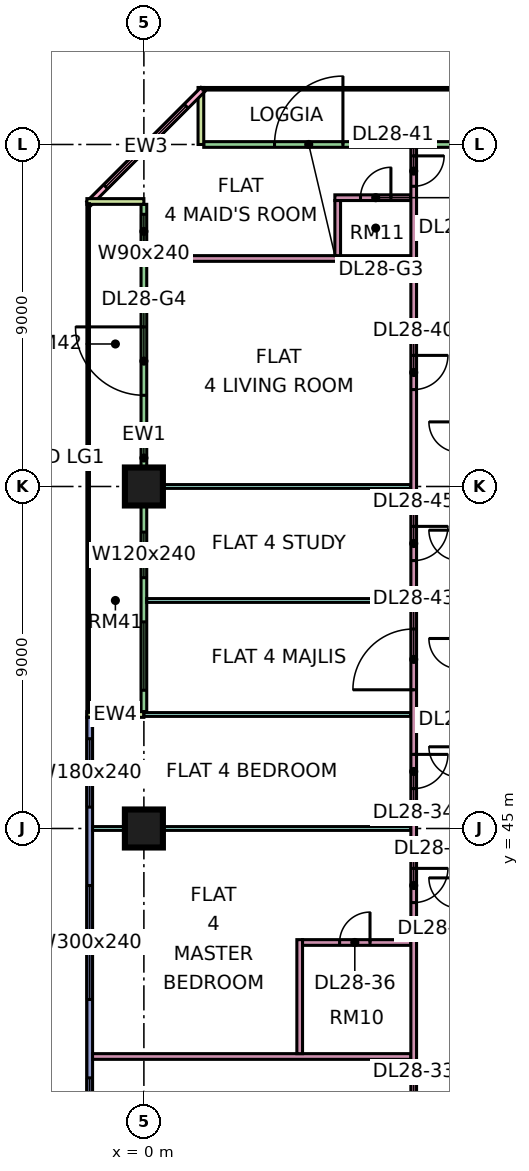
"""IFC4 building model, lengths in metres.
Left out: names, types, materials, properties, quantities, classifications, styles, units other than length and angle.
Written with IfcOpenShell. Run it as: python <this file> out.ifc"""

import sys

from ifc_helpers import new_model, si_unit, direction, frame, frame_2d, origin, origin_2d, place, context, subcontext, project, spatial, rectangle, extrude, element, fill, save


model = new_model("IFC4")
c1 = context("Model", 3, precision=1e-05, world=origin(), true_north=direction((0.0, 1.0)))
c2 = subcontext(c1, "Body", "Model", "MODEL_VIEW")
j1 = project(units=[si_unit("LENGTHUNIT", "METRE"), si_unit("PLANEANGLEUNIT", "RADIAN")], contexts=[c1])
p1 = place(None, origin())
s1 = spatial("IfcSite", under=j1, at=p1, CompositionType="ELEMENT")
p2 = place(p1, origin())
s2 = spatial("IfcBuilding", under=s1, at=p2, CompositionType="ELEMENT")
p3 = place(p2, frame((0.0, 0.0, 121.9)))
s3 = spatial("IfcBuildingStorey", under=s2, at=p3, CompositionType="ELEMENT", Elevation=121.9)
for number, where, z_axis, x_axis in (
    (1, (0.0, 45.0, 0.0), (0.0, 0.0, 1.0), (1.0, 0.0, 0.0)),
    (2, (0.0, 54.0, 0.0), (0.0, 0.0, 1.0), (1.0, 0.0, 0.0)),
):
    element("IfcColumn", number, at=place(p3, frame(where, z_axis=z_axis, x_axis=x_axis)), inside=s3, PredefinedType="COLUMN", context=c2, shape_type="SweptSolid", body=[
        extrude(rectangle(XDim=1.0, YDim=1.0, at=origin_2d()), origin(), (0.0, 0.0, 1.0), 3.75),
    ])
p4 = place(p3, frame((11.925, 63.0, 0.0), z_axis=(0.0, 0.0, 1.0), x_axis=(-1.0, 0.0, 0.0)))
e3 = element("IfcWall", 3, at=p4, inside=s3, PredefinedType="SOLIDWALL", context=c2, shape_type="SweptSolid", body=[
    extrude(rectangle(XDim=10.35, YDim=0.15, at=frame_2d((5.175, 0.0))), origin(), (0.0, 0.0, 1.0), 3.35),
])
p5 = place(p4, frame((0.875, 0.0, 0.45)))
e4 = element("IfcOpeningElement", 4, at=p5, cuts=e3, PredefinedType="OPENING", context=c2, shape_type="SweptSolid", body=[
    extrude(rectangle(XDim=2.4, YDim=2.4, at=frame_2d((1.2, 1.2))), frame((0.0, 0.085, 0.0), z_axis=(0.0, -1.0, 0.0), x_axis=(1.0, 0.0, 0.0)), (0.0, 0.0, 1.0), 0.17),
])
p6 = place(p4, frame((6.688, 0.0, 0.0)))
e5 = element("IfcOpeningElement", 5, at=p6, cuts=e3, PredefinedType="OPENING", context=c2, shape_type="SweptSolid", body=[
    extrude(rectangle(XDim=1.8, YDim=2.4, at=frame_2d((0.9, 1.2))), frame((0.0, 0.085, 0.0), z_axis=(0.0, -1.0, 0.0), x_axis=(1.0, 0.0, 0.0)), (0.0, 0.0, 1.0), 0.17),
])
p7 = place(p3, frame((1.5, 64.5, 0.0), z_axis=(0.0, 0.0, 1.0), x_axis=(0.0, -1.0, 0.0)))
e6 = element("IfcWall", 6, at=p7, inside=s3, PredefinedType="SOLIDWALL", context=c2, shape_type="SweptSolid", body=[
    extrude(rectangle(XDim=1.5, YDim=0.15, at=frame_2d((0.75, 0.0))), origin(), (0.0, 0.0, 1.0), 3.35),
])
p8 = place(p3, frame((1.553, 64.447, 0.0), z_axis=(0.0, 0.0, 1.0), x_axis=(-0.707106781187, -0.707106781187, 0.0)))
e7 = element("IfcWall", 7, at=p8, inside=s3, PredefinedType="SOLIDWALL", context=c2, shape_type="SweptSolid", body=[
    extrude(rectangle(XDim=4.243, YDim=0.15, at=frame_2d((2.121, 0.0))), origin(), (0.0, 0.0, 1.0), 3.35),
])
p9 = place(p8, frame((0.621, 0.0, 0.45)))
e8 = element("IfcOpeningElement", 8, at=p9, cuts=e7, PredefinedType="OPENING", context=c2, shape_type="SweptSolid", body=[
    extrude(rectangle(XDim=3.0, YDim=2.4, at=frame_2d((1.5, 1.2))), frame((0.0, 0.085, 0.0), z_axis=(0.0, -1.0, 0.0), x_axis=(1.0, 0.0, 0.0)), (0.0, 0.0, 1.0), 0.17),
])
p10 = place(p3, frame((0.0, 61.425, 0.0), z_axis=(0.0, 0.0, 1.0), x_axis=(0.0, -1.0, 0.0)))
e9 = element("IfcWall", 9, at=p10, inside=s3, PredefinedType="SOLIDWALL", context=c2, shape_type="SweptSolid", body=[
    extrude(rectangle(XDim=13.35, YDim=0.15, at=frame_2d((6.675, 0.0))), origin(), (0.0, 0.0, 1.0), 3.35),
])
p11 = place(p10, frame((0.262, 0.0, 0.45)))
e10 = element("IfcOpeningElement", 10, at=p11, cuts=e9, PredefinedType="OPENING", context=c2, shape_type="SweptSolid", body=[
    extrude(rectangle(XDim=0.9, YDim=2.4, at=frame_2d((0.45, 1.2))), frame((0.0, 0.085, 0.0), z_axis=(0.0, -1.0, 0.0), x_axis=(1.0, 0.0, 0.0)), (0.0, 0.0, 1.0), 0.17),
])
p12 = place(p10, frame((3.225, 0.0, 0.0)))
e11 = element("IfcOpeningElement", 11, at=p12, cuts=e9, PredefinedType="OPENING", context=c2, shape_type="SweptSolid", body=[
    extrude(rectangle(XDim=1.8, YDim=2.4, at=frame_2d((0.9, 1.2))), frame((0.0, 0.085, 0.0), z_axis=(0.0, -1.0, 0.0), x_axis=(1.0, 0.0, 0.0)), (0.0, 0.0, 1.0), 0.17),
])
p13 = place(p10, frame((8.625, 0.0, 0.45)))
e12 = element("IfcOpeningElement", 12, at=p13, cuts=e9, PredefinedType="OPENING", context=c2, shape_type="SweptSolid", body=[
    extrude(rectangle(XDim=1.2, YDim=2.4, at=frame_2d((0.6, 1.2))), frame((0.0, 0.085, 0.0), z_axis=(0.0, -1.0, 0.0), x_axis=(1.0, 0.0, 0.0)), (0.0, 0.0, 1.0), 0.17),
])
p14 = place(p10, frame((10.988, 0.0, 0.45)))
e13 = element("IfcOpeningElement", 13, at=p14, cuts=e9, PredefinedType="OPENING", context=c2, shape_type="SweptSolid", body=[
    extrude(rectangle(XDim=1.8, YDim=2.4, at=frame_2d((0.9, 1.2))), frame((0.0, 0.085, 0.0), z_axis=(0.0, -1.0, 0.0), x_axis=(1.0, 0.0, 0.0)), (0.0, 0.0, 1.0), 0.17),
])
for number, where, z_axis, x_axis in (
    (14, (-1.5, 61.5, 0.0), (0.0, 0.0, 1.0), (1.0, 0.0, 0.0)),
    (15, (-1.5, 48.0, 0.0), (0.0, 0.0, 1.0), (1.0, 0.0, 0.0)),
):
    element("IfcWall", number, at=place(p3, frame(where, z_axis=z_axis, x_axis=x_axis)), inside=s3, PredefinedType="SOLIDWALL", context=c2, shape_type="SweptSolid", body=[
        extrude(rectangle(XDim=1.5, YDim=0.15, at=frame_2d((0.75, 0.0))), origin(), (0.0, 0.0, 1.0), 3.35),
    ])
p15 = place(p3, frame((-1.425, 47.925, 0.0), z_axis=(0.0, 0.0, 1.0), x_axis=(0.0, -1.0, 0.0)))
e16 = element("IfcWall", 16, at=p15, inside=s3, PredefinedType="SOLIDWALL", context=c2, shape_type="SweptSolid", body=[
    extrude(rectangle(XDim=11.85, YDim=0.15, at=frame_2d((5.925, 0.0))), origin(), (0.0, 0.0, 1.0), 3.35),
])
p16 = place(p15, frame((0.562, 0.0, 0.45)))
e17 = element("IfcOpeningElement", 17, at=p16, cuts=e16, PredefinedType="OPENING", context=c2, shape_type="SweptSolid", body=[
    extrude(rectangle(XDim=1.8, YDim=2.4, at=frame_2d((0.9, 1.2))), frame((0.0, 0.085, 0.0), z_axis=(0.0, -1.0, 0.0), x_axis=(1.0, 0.0, 0.0)), (0.0, 0.0, 1.0), 0.17),
])
p17 = place(p15, frame((4.425, 0.0, 0.45)))
e18 = element("IfcOpeningElement", 18, at=p17, cuts=e16, PredefinedType="OPENING", context=c2, shape_type="SweptSolid", body=[
    extrude(rectangle(XDim=3.0, YDim=2.4, at=frame_2d((1.5, 1.2))), frame((0.0, 0.085, 0.0), z_axis=(0.0, -1.0, 0.0), x_axis=(1.0, 0.0, 0.0)), (0.0, 0.0, 1.0), 0.17),
])
p18 = place(p15, frame((9.488, 0.0, 0.45)))
e19 = element("IfcOpeningElement", 19, at=p18, cuts=e16, PredefinedType="OPENING", context=c2, shape_type="SweptSolid", body=[
    extrude(rectangle(XDim=1.8, YDim=2.4, at=frame_2d((0.9, 1.2))), frame((0.0, 0.085, 0.0), z_axis=(0.0, -1.0, 0.0), x_axis=(1.0, 0.0, 0.0)), (0.0, 0.0, 1.0), 0.17),
])
p19 = place(p3, frame((-1.351, 39.0, 0.0), z_axis=(0.0, 0.0, 1.0), x_axis=(1.0, 0.0, 0.0)))
e20 = element("IfcWall", 20, at=p19, inside=s3, PredefinedType="PARTITIONING", context=c2, shape_type="SweptSolid", body=[
    extrude(rectangle(XDim=8.376, YDim=0.15, at=frame_2d((4.188, 0.0))), origin(), (0.0, 0.0, 1.0), 3.35),
])
p20 = place(p3, frame((-1.351, 45.0, 0.0), z_axis=(0.0, 0.0, 1.0), x_axis=(1.0, 0.0, 0.0)))
e21 = element("IfcWall", 21, at=p20, inside=s3, PredefinedType="PARTITIONING", context=c2, shape_type="SweptSolid", body=[
    extrude(rectangle(XDim=8.376, YDim=0.1, at=frame_2d((4.188, 0.0))), origin(), (0.0, 0.0, 1.0), 3.35),
])
p21 = place(p3, frame((0.0, 48.0, 0.0), z_axis=(0.0, 0.0, 1.0), x_axis=(1.0, 0.0, 0.0)))
e22 = element("IfcWall", 22, at=p21, inside=s3, PredefinedType="PARTITIONING", context=c2, shape_type="SweptSolid", body=[
    extrude(rectangle(XDim=7.025, YDim=0.1, at=frame_2d((3.512, 0.0))), origin(), (0.0, 0.0, 1.0), 3.35),
])
for number, where, z_axis, x_axis in (
    (23, (0.074, 51.0, 0.0), (0.0, 0.0, 1.0), (1.0, 0.0, 0.0)),
    (24, (0.074, 54.0, 0.0), (0.0, 0.0, 1.0), (1.0, 0.0, 0.0)),
):
    element("IfcWall", number, at=place(p3, frame(where, z_axis=z_axis, x_axis=x_axis)), inside=s3, PredefinedType="PARTITIONING", context=c2, shape_type="SweptSolid", body=[
        extrude(rectangle(XDim=6.951, YDim=0.1, at=frame_2d((3.476, 0.0))), origin(), (0.0, 0.0, 1.0), 3.35),
    ])
p22 = place(p3, frame((0.074, 60.0, 0.0), z_axis=(0.0, 0.0, 1.0), x_axis=(1.0, 0.0, 0.0)))
e25 = element("IfcWall", 25, at=p22, inside=s3, PredefinedType="PARTITIONING", context=c2, shape_type="SweptSolid", body=[
    extrude(rectangle(XDim=6.951, YDim=0.15, at=frame_2d((3.476, 0.0))), origin(), (0.0, 0.0, 1.0), 3.35),
])
p23 = place(p3, frame((4.1, 39.075, 0.0), z_axis=(0.0, 0.0, 1.0), x_axis=(0.0, 1.0, 0.0)))
e26 = element("IfcWall", 26, at=p23, inside=s3, PredefinedType="PARTITIONING", context=c2, shape_type="SweptSolid", body=[
    extrude(rectangle(XDim=3.0, YDim=0.15, at=frame_2d((1.5, 0.0))), origin(), (0.0, 0.0, 1.0), 3.35),
])
p24 = place(p3, frame((4.175, 42.0, 0.0), z_axis=(0.0, 0.0, 1.0), x_axis=(1.0, 0.0, 0.0)))
e27 = element("IfcWall", 27, at=p24, inside=s3, PredefinedType="PARTITIONING", context=c2, shape_type="SweptSolid", body=[
    extrude(rectangle(XDim=2.85, YDim=0.15, at=frame_2d((1.425, 0.0))), origin(), (0.0, 0.0, 1.0), 3.35),
])
p25 = place(p24, frame((0.975, 0.0, 0.0)))
e28 = element("IfcOpeningElement", 28, at=p25, cuts=e27, PredefinedType="OPENING", context=c2, shape_type="SweptSolid", body=[
    extrude(rectangle(XDim=0.8, YDim=2.1, at=frame_2d((0.4, 1.05))), frame((0.0, 0.085, 0.0), z_axis=(0.0, -1.0, 0.0), x_axis=(1.0, 0.0, 0.0)), (0.0, 0.0, 1.0), 0.17),
])
p26 = place(p3, frame((5.025, 61.6, 0.0), z_axis=(0.0, 0.0, 1.0), x_axis=(1.0, 0.0, 0.0)))
e29 = element("IfcWall", 29, at=p26, inside=s3, PredefinedType="PARTITIONING", context=c2, shape_type="SweptSolid", body=[
    extrude(rectangle(XDim=2.0, YDim=0.15, at=frame_2d((1.0, 0.0))), origin(), (0.0, 0.0, 1.0), 3.35),
])
p27 = place(p26, frame((0.675, 0.0, 0.0)))
e30 = element("IfcOpeningElement", 30, at=p27, cuts=e29, PredefinedType="OPENING", context=c2, shape_type="SweptSolid", body=[
    extrude(rectangle(XDim=0.8, YDim=2.1, at=frame_2d((0.4, 1.05))), frame((0.0, 0.085, 0.0), z_axis=(0.0, -1.0, 0.0), x_axis=(1.0, 0.0, 0.0)), (0.0, 0.0, 1.0), 0.17),
])
p28 = place(p3, frame((5.1, 60.075, 0.0), z_axis=(0.0, 0.0, 1.0), x_axis=(0.0, 1.0, 0.0)))
e31 = element("IfcWall", 31, at=p28, inside=s3, PredefinedType="PARTITIONING", context=c2, shape_type="SweptSolid", body=[
    extrude(rectangle(XDim=1.45, YDim=0.15, at=frame_2d((0.725, 0.0))), origin(), (0.0, 0.0, 1.0), 3.35),
])
p29 = place(p3, frame((7.1, 36.1, 0.0), z_axis=(0.0, 0.0, 1.0), x_axis=(0.0, 1.0, 0.0)))
e32 = element("IfcWall", 32, at=p29, inside=s3, PredefinedType="PARTITIONING", context=c2, shape_type="SweptSolid", body=[
    extrude(rectangle(XDim=26.826, YDim=0.15, at=frame_2d((13.413, 0.0))), origin(), (0.0, 0.0, 1.0), 3.35),
])
p30 = place(p29, frame((0.95, 0.0, 0.0)))
e33 = element("IfcOpeningElement", 33, at=p30, cuts=e32, PredefinedType="OPENING", context=c2, shape_type="SweptSolid", body=[
    extrude(rectangle(XDim=0.9, YDim=2.1, at=frame_2d((0.45, 1.05))), frame((0.0, 0.085, 0.0), z_axis=(0.0, -1.0, 0.0), x_axis=(1.0, 0.0, 0.0)), (0.0, 0.0, 1.0), 0.17),
])
p31 = place(p29, frame((9.95, 0.0, 0.0)))
e34 = element("IfcOpeningElement", 34, at=p31, cuts=e32, PredefinedType="OPENING", context=c2, shape_type="SweptSolid", body=[
    extrude(rectangle(XDim=0.9, YDim=2.1, at=frame_2d((0.45, 1.05))), frame((0.0, 0.085, 0.0), z_axis=(0.0, -1.0, 0.0), x_axis=(1.0, 0.0, 0.0)), (0.0, 0.0, 1.0), 0.17),
])
p32 = place(p29, frame((6.95, 0.0, 0.0)))
e35 = element("IfcOpeningElement", 35, at=p32, cuts=e32, PredefinedType="OPENING", context=c2, shape_type="SweptSolid", body=[
    extrude(rectangle(XDim=0.9, YDim=2.1, at=frame_2d((0.45, 1.05))), frame((0.0, 0.085, 0.0), z_axis=(0.0, -1.0, 0.0), x_axis=(1.0, 0.0, 0.0)), (0.0, 0.0, 1.0), 0.17),
])
p33 = place(p29, frame((20.45, 0.0, 0.0)))
e36 = element("IfcOpeningElement", 36, at=p33, cuts=e32, PredefinedType="OPENING", context=c2, shape_type="SweptSolid", body=[
    extrude(rectangle(XDim=0.9, YDim=2.1, at=frame_2d((0.45, 1.05))), frame((0.0, 0.085, 0.0), z_axis=(0.0, -1.0, 0.0), x_axis=(1.0, 0.0, 0.0)), (0.0, 0.0, 1.0), 0.17),
])
p34 = place(p29, frame((25.8, 0.0, 0.0)))
e37 = element("IfcOpeningElement", 37, at=p34, cuts=e32, PredefinedType="OPENING", context=c2, shape_type="SweptSolid", body=[
    extrude(rectangle(XDim=0.8, YDim=2.1, at=frame_2d((0.4, 1.05))), frame((0.0, 0.085, 0.0), z_axis=(0.0, -1.0, 0.0), x_axis=(1.0, 0.0, 0.0)), (0.0, 0.0, 1.0), 0.17),
])
p35 = place(p29, frame((12.55, 0.0, 0.0)))
e38 = element("IfcOpeningElement", 38, at=p35, cuts=e32, PredefinedType="OPENING", context=c2, shape_type="SweptSolid", body=[
    extrude(rectangle(XDim=1.6, YDim=2.1, at=frame_2d((0.8, 1.05))), frame((0.0, 0.085, 0.0), z_axis=(0.0, -1.0, 0.0), x_axis=(1.0, 0.0, 0.0)), (0.0, 0.0, 1.0), 0.17),
])
p36 = place(p29, frame((15.95, 0.0, 0.0)))
e39 = element("IfcOpeningElement", 39, at=p36, cuts=e32, PredefinedType="OPENING", context=c2, shape_type="SweptSolid", body=[
    extrude(rectangle(XDim=0.9, YDim=2.1, at=frame_2d((0.45, 1.05))), frame((0.0, 0.085, 0.0), z_axis=(0.0, -1.0, 0.0), x_axis=(1.0, 0.0, 0.0)), (0.0, 0.0, 1.0), 0.17),
])
p37 = place(p6, frame((1.8, 0.0, 0.0), z_axis=(0.0, 0.0, 1.0), x_axis=(-1.0, 0.0, 0.0)))
e40 = element("IfcDoor", 40, at=p37, inside=s3, OperationType="DOUBLE_DOOR_SINGLE_SWING", PredefinedType="DOOR", context=c2, shape_type="SweptSolid", body=[
    extrude(rectangle(XDim=1.8, YDim=2.4, at=frame_2d((0.9, 1.2))), frame((0.0, 0.025, 0.0), z_axis=(0.0, -1.0, 0.0), x_axis=(1.0, 0.0, 0.0)), (0.0, 0.0, 1.0), 0.05),
])
fill(e5, e40)
p38 = place(p9, origin())
e41 = element("IfcWindow", 41, at=p38, inside=s3, PartitioningType="SINGLE_PANEL", PredefinedType="WINDOW", context=c2, shape_type="SweptSolid", body=[
    extrude(rectangle(XDim=3.0, YDim=2.4, at=frame_2d((1.5, 1.2))), frame((0.0, 0.03, 0.0), z_axis=(0.0, -1.0, 0.0), x_axis=(1.0, 0.0, 0.0)), (0.0, 0.0, 1.0), 0.06),
])
fill(e8, e41)
p39 = place(p11, origin())
e42 = element("IfcWindow", 42, at=p39, inside=s3, PartitioningType="SINGLE_PANEL", PredefinedType="WINDOW", context=c2, shape_type="SweptSolid", body=[
    extrude(rectangle(XDim=0.9, YDim=2.4, at=frame_2d((0.45, 1.2))), frame((0.0, 0.03, 0.0), z_axis=(0.0, -1.0, 0.0), x_axis=(1.0, 0.0, 0.0)), (0.0, 0.0, 1.0), 0.06),
])
fill(e10, e42)
p40 = place(p12, frame((1.8, 0.0, 0.0), z_axis=(0.0, 0.0, 1.0), x_axis=(-1.0, 0.0, 0.0)))
e43 = element("IfcDoor", 43, at=p40, inside=s3, OperationType="DOUBLE_DOOR_SINGLE_SWING", PredefinedType="DOOR", context=c2, shape_type="SweptSolid", body=[
    extrude(rectangle(XDim=1.8, YDim=2.4, at=frame_2d((0.9, 1.2))), frame((0.0, 0.025, 0.0), z_axis=(0.0, -1.0, 0.0), x_axis=(1.0, 0.0, 0.0)), (0.0, 0.0, 1.0), 0.05),
])
fill(e11, e43)
p41 = place(p13, origin())
e44 = element("IfcWindow", 44, at=p41, inside=s3, PartitioningType="SINGLE_PANEL", PredefinedType="WINDOW", context=c2, shape_type="SweptSolid", body=[
    extrude(rectangle(XDim=1.2, YDim=2.4, at=frame_2d((0.6, 1.2))), frame((0.0, 0.03, 0.0), z_axis=(0.0, -1.0, 0.0), x_axis=(1.0, 0.0, 0.0)), (0.0, 0.0, 1.0), 0.06),
])
fill(e12, e44)
p42 = place(p14, origin())
e45 = element("IfcWindow", 45, at=p42, inside=s3, PartitioningType="SINGLE_PANEL", PredefinedType="WINDOW", context=c2, shape_type="SweptSolid", body=[
    extrude(rectangle(XDim=1.8, YDim=2.4, at=frame_2d((0.9, 1.2))), frame((0.0, 0.03, 0.0), z_axis=(0.0, -1.0, 0.0), x_axis=(1.0, 0.0, 0.0)), (0.0, 0.0, 1.0), 0.06),
])
fill(e13, e45)
p43 = place(p16, origin())
e46 = element("IfcWindow", 46, at=p43, inside=s3, PartitioningType="SINGLE_PANEL", PredefinedType="WINDOW", context=c2, shape_type="SweptSolid", body=[
    extrude(rectangle(XDim=1.8, YDim=2.4, at=frame_2d((0.9, 1.2))), frame((0.0, 0.03, 0.0), z_axis=(0.0, -1.0, 0.0), x_axis=(1.0, 0.0, 0.0)), (0.0, 0.0, 1.0), 0.06),
])
fill(e17, e46)
p44 = place(p17, origin())
e47 = element("IfcWindow", 47, at=p44, inside=s3, PartitioningType="SINGLE_PANEL", PredefinedType="WINDOW", context=c2, shape_type="SweptSolid", body=[
    extrude(rectangle(XDim=3.0, YDim=2.4, at=frame_2d((1.5, 1.2))), frame((0.0, 0.03, 0.0), z_axis=(0.0, -1.0, 0.0), x_axis=(1.0, 0.0, 0.0)), (0.0, 0.0, 1.0), 0.06),
])
fill(e18, e47)
p45 = place(p18, origin())
e48 = element("IfcWindow", 48, at=p45, inside=s3, PartitioningType="SINGLE_PANEL", PredefinedType="WINDOW", context=c2, shape_type="SweptSolid", body=[
    extrude(rectangle(XDim=1.8, YDim=2.4, at=frame_2d((0.9, 1.2))), frame((0.0, 0.03, 0.0), z_axis=(0.0, -1.0, 0.0), x_axis=(1.0, 0.0, 0.0)), (0.0, 0.0, 1.0), 0.06),
])
fill(e19, e48)
p46 = place(p31, origin())
e49 = element("IfcDoor", 49, at=p46, inside=s3, OperationType="SINGLE_SWING_RIGHT", PredefinedType="DOOR", context=c2, shape_type="SweptSolid", body=[
    extrude(rectangle(XDim=0.9, YDim=2.1, at=frame_2d((0.45, 1.05))), frame((0.0, 0.025, 0.0), z_axis=(0.0, -1.0, 0.0), x_axis=(1.0, 0.0, 0.0)), (0.0, 0.0, 1.0), 0.05),
])
fill(e34, e49)
p47 = place(p32, origin())
e50 = element("IfcDoor", 50, at=p47, inside=s3, OperationType="SINGLE_SWING_RIGHT", PredefinedType="DOOR", context=c2, shape_type="SweptSolid", body=[
    extrude(rectangle(XDim=0.9, YDim=2.1, at=frame_2d((0.45, 1.05))), frame((0.0, 0.025, 0.0), z_axis=(0.0, -1.0, 0.0), x_axis=(1.0, 0.0, 0.0)), (0.0, 0.0, 1.0), 0.05),
])
fill(e35, e50)
p48 = place(p25, frame((0.8, 0.0, 0.0), z_axis=(0.0, 0.0, 1.0), x_axis=(-1.0, 0.0, 0.0)))
e51 = element("IfcDoor", 51, at=p48, inside=s3, OperationType="SINGLE_SWING_RIGHT", PredefinedType="DOOR", context=c2, shape_type="SweptSolid", body=[
    extrude(rectangle(XDim=0.8, YDim=2.1, at=frame_2d((0.4, 1.05))), frame((0.0, 0.025, 0.0), z_axis=(0.0, -1.0, 0.0), x_axis=(1.0, 0.0, 0.0)), (0.0, 0.0, 1.0), 0.05),
])
fill(e28, e51)
p49 = place(p33, origin())
e52 = element("IfcDoor", 52, at=p49, inside=s3, OperationType="SINGLE_SWING_RIGHT", PredefinedType="DOOR", context=c2, shape_type="SweptSolid", body=[
    extrude(rectangle(XDim=0.9, YDim=2.1, at=frame_2d((0.45, 1.05))), frame((0.0, 0.025, 0.0), z_axis=(0.0, -1.0, 0.0), x_axis=(1.0, 0.0, 0.0)), (0.0, 0.0, 1.0), 0.05),
])
fill(e36, e52)
p50 = place(p34, origin())
e53 = element("IfcDoor", 53, at=p50, inside=s3, OperationType="SINGLE_SWING_RIGHT", PredefinedType="DOOR", context=c2, shape_type="SweptSolid", body=[
    extrude(rectangle(XDim=0.8, YDim=2.1, at=frame_2d((0.4, 1.05))), frame((0.0, 0.025, 0.0), z_axis=(0.0, -1.0, 0.0), x_axis=(1.0, 0.0, 0.0)), (0.0, 0.0, 1.0), 0.05),
])
fill(e37, e53)
p51 = place(p27, frame((0.8, 0.0, 0.0), z_axis=(0.0, 0.0, 1.0), x_axis=(-1.0, 0.0, 0.0)))
e54 = element("IfcDoor", 54, at=p51, inside=s3, OperationType="SINGLE_SWING_RIGHT", PredefinedType="DOOR", context=c2, shape_type="SweptSolid", body=[
    extrude(rectangle(XDim=0.8, YDim=2.1, at=frame_2d((0.4, 1.05))), frame((0.0, 0.025, 0.0), z_axis=(0.0, -1.0, 0.0), x_axis=(1.0, 0.0, 0.0)), (0.0, 0.0, 1.0), 0.05),
])
fill(e30, e54)
p52 = place(p35, origin())
e55 = element("IfcDoor", 55, at=p52, inside=s3, OperationType="DOUBLE_DOOR_SINGLE_SWING", PredefinedType="DOOR", context=c2, shape_type="SweptSolid", body=[
    extrude(rectangle(XDim=1.6, YDim=2.1, at=frame_2d((0.8, 1.05))), frame((0.0, 0.025, 0.0), z_axis=(0.0, -1.0, 0.0), x_axis=(1.0, 0.0, 0.0)), (0.0, 0.0, 1.0), 0.05),
])
fill(e38, e55)
p53 = place(p36, origin())
e56 = element("IfcDoor", 56, at=p53, inside=s3, OperationType="SINGLE_SWING_RIGHT", PredefinedType="DOOR", context=c2, shape_type="SweptSolid", body=[
    extrude(rectangle(XDim=0.9, YDim=2.1, at=frame_2d((0.45, 1.05))), frame((0.0, 0.025, 0.0), z_axis=(0.0, -1.0, 0.0), x_axis=(1.0, 0.0, 0.0)), (0.0, 0.0, 1.0), 0.05),
])
fill(e39, e56)
save(model, sys.argv[1])
